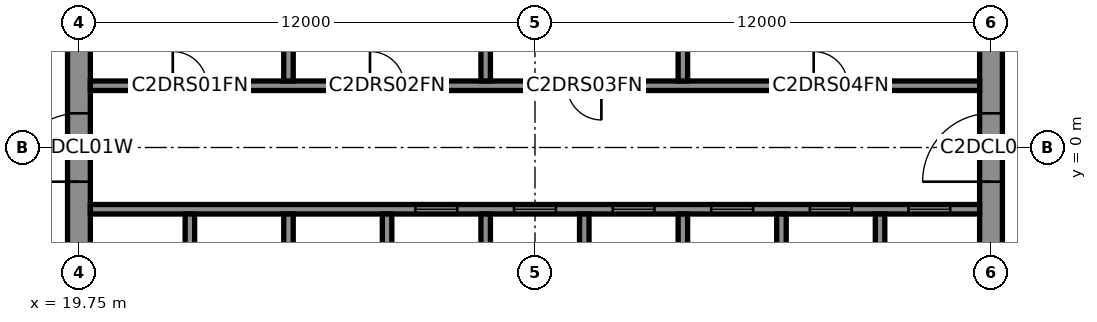
"""IFC4 building model, lengths in metres.
Left out: names, types, materials, properties, quantities, classifications, styles, units other than length and angle.
Written with IfcOpenShell. Run it as: python <this file> out.ifc"""

import sys

from ifc_helpers import new_model, si_unit, direction, frame, frame_2d, origin, place, context, subcontext, project, spatial, rectangle, extrude, element, fill, save


model = new_model("IFC4")
c1 = context("Model", 3, precision=1e-05, world=origin(), true_north=direction((0.0, 1.0)))
c2 = subcontext(c1, "Body", "Model", "MODEL_VIEW")
j1 = project(units=[si_unit("LENGTHUNIT", "METRE"), si_unit("PLANEANGLEUNIT", "RADIAN")], contexts=[c1])
p1 = place(None, origin())
s1 = spatial("IfcSite", under=j1, at=p1, CompositionType="ELEMENT")
p2 = place(p1, origin())
s2 = spatial("IfcBuilding", under=s1, at=p2, CompositionType="ELEMENT")
p3 = place(p2, frame((0.0, 0.0, 204.5)))
s3 = spatial("IfcBuildingStorey", under=s2, at=p3, CompositionType="ELEMENT", Elevation=204.5)
p4 = place(p3, frame((43.75, -8.0, 0.0), z_axis=(0.0, 0.0, 1.0), x_axis=(0.0, 1.0, 0.0)))
e1 = element("IfcWall", 1, at=p4, inside=s3, PredefinedType="SHEAR", context=c2, shape_type="SweptSolid", body=[
    extrude(rectangle(XDim=16.0, YDim=0.6, at=frame_2d((8.0, 0.0))), origin(), (0.0, 0.0, 1.0), 6.0),
])
p5 = place(p4, frame((7.1, 0.0, 0.0)))
e2 = element("IfcOpeningElement", 2, at=p5, cuts=e1, PredefinedType="OPENING", context=c2, shape_type="SweptSolid", body=[
    extrude(rectangle(XDim=1.8, YDim=2.1, at=frame_2d((0.9, 1.05))), frame((0.0, 0.31, 0.0), z_axis=(0.0, -1.0, 0.0), x_axis=(1.0, 0.0, 0.0)), (0.0, 0.0, 1.0), 0.62),
])
p6 = place(p3, frame((19.75, -8.0, 0.0), z_axis=(0.0, 0.0, 1.0), x_axis=(0.0, 1.0, 0.0)))
e3 = element("IfcWall", 3, at=p6, inside=s3, PredefinedType="SHEAR", context=c2, shape_type="SweptSolid", body=[
    extrude(rectangle(XDim=16.0, YDim=0.6, at=frame_2d((8.0, 0.0))), origin(), (0.0, 0.0, 1.0), 6.0),
])
p7 = place(p6, frame((7.1, 0.0, 0.0)))
e4 = element("IfcOpeningElement", 4, at=p7, cuts=e3, PredefinedType="OPENING", context=c2, shape_type="SweptSolid", body=[
    extrude(rectangle(XDim=1.8, YDim=2.1, at=frame_2d((0.9, 1.05))), frame((0.0, 0.31, 0.0), z_axis=(0.0, -1.0, 0.0), x_axis=(1.0, 0.0, 0.0)), (0.0, 0.0, 1.0), 0.62),
])
p8 = place(p3, frame((20.05, 1.625, 0.0), z_axis=(0.0, 0.0, 1.0), x_axis=(1.0, 0.0, 0.0)))
e5 = element("IfcWall", 5, at=p8, inside=s3, PredefinedType="SHEAR", context=c2, shape_type="SweptSolid", body=[
    extrude(rectangle(XDim=23.4, YDim=0.25, at=frame_2d((11.7, 0.0))), origin(), (0.0, 0.0, 1.0), 6.0),
])
p9 = place(p8, frame((2.169, 0.0, 0.0)))
e6 = element("IfcOpeningElement", 6, at=p9, cuts=e5, PredefinedType="OPENING", context=c2, shape_type="SweptSolid", body=[
    extrude(rectangle(XDim=0.9, YDim=2.1, at=frame_2d((0.45, 1.05))), frame((0.0, 0.135, 0.0), z_axis=(0.0, -1.0, 0.0), x_axis=(1.0, 0.0, 0.0)), (0.0, 0.0, 1.0), 0.27),
])
p10 = place(p8, frame((7.358, 0.0, 0.0)))
e7 = element("IfcOpeningElement", 7, at=p10, cuts=e5, PredefinedType="OPENING", context=c2, shape_type="SweptSolid", body=[
    extrude(rectangle(XDim=0.9, YDim=2.1, at=frame_2d((0.45, 1.05))), frame((0.0, 0.135, 0.0), z_axis=(0.0, -1.0, 0.0), x_axis=(1.0, 0.0, 0.0)), (0.0, 0.0, 1.0), 0.27),
])
p11 = place(p8, frame((12.547, 0.0, 0.0)))
e8 = element("IfcOpeningElement", 8, at=p11, cuts=e5, PredefinedType="OPENING", context=c2, shape_type="SweptSolid", body=[
    extrude(rectangle(XDim=0.9, YDim=2.1, at=frame_2d((0.45, 1.05))), frame((0.0, 0.135, 0.0), z_axis=(0.0, -1.0, 0.0), x_axis=(1.0, 0.0, 0.0)), (0.0, 0.0, 1.0), 0.27),
])
p12 = place(p8, frame((19.033, 0.0, 0.0)))
e9 = element("IfcOpeningElement", 9, at=p12, cuts=e5, PredefinedType="OPENING", context=c2, shape_type="SweptSolid", body=[
    extrude(rectangle(XDim=0.9, YDim=2.1, at=frame_2d((0.45, 1.05))), frame((0.0, 0.135, 0.0), z_axis=(0.0, -1.0, 0.0), x_axis=(1.0, 0.0, 0.0)), (0.0, 0.0, 1.0), 0.27),
])
p13 = place(p3, frame((20.05, -1.625, 0.0), z_axis=(0.0, 0.0, 1.0), x_axis=(1.0, 0.0, 0.0)))
e10 = element("IfcWall", 10, at=p13, inside=s3, PredefinedType="SHEAR", context=c2, shape_type="SweptSolid", body=[
    extrude(rectangle(XDim=23.4, YDim=0.25, at=frame_2d((11.7, 0.0))), origin(), (0.0, 0.0, 1.0), 6.0),
])
p14 = place(p13, frame((8.556, 0.0, 0.0)))
e11 = element("IfcOpeningElement", 11, at=p14, cuts=e10, PredefinedType="OPENING", context=c2, shape_type="SweptSolid", body=[
    extrude(rectangle(XDim=1.1, YDim=2.1, at=frame_2d((0.55, 1.05))), frame((0.0, 0.135, 0.0), z_axis=(0.0, -1.0, 0.0), x_axis=(1.0, 0.0, 0.0)), (0.0, 0.0, 1.0), 0.27),
])
p15 = place(p13, frame((11.15, 0.0, 0.0)))
e12 = element("IfcOpeningElement", 12, at=p15, cuts=e10, PredefinedType="OPENING", context=c2, shape_type="SweptSolid", body=[
    extrude(rectangle(XDim=1.1, YDim=2.1, at=frame_2d((0.55, 1.05))), frame((0.0, 0.135, 0.0), z_axis=(0.0, -1.0, 0.0), x_axis=(1.0, 0.0, 0.0)), (0.0, 0.0, 1.0), 0.27),
])
p16 = place(p13, frame((13.744, 0.0, 0.0)))
e13 = element("IfcOpeningElement", 13, at=p16, cuts=e10, PredefinedType="OPENING", context=c2, shape_type="SweptSolid", body=[
    extrude(rectangle(XDim=1.1, YDim=2.1, at=frame_2d((0.55, 1.05))), frame((0.0, 0.135, 0.0), z_axis=(0.0, -1.0, 0.0), x_axis=(1.0, 0.0, 0.0)), (0.0, 0.0, 1.0), 0.27),
])
p17 = place(p13, frame((16.339, 0.0, 0.0)))
e14 = element("IfcOpeningElement", 14, at=p17, cuts=e10, PredefinedType="OPENING", context=c2, shape_type="SweptSolid", body=[
    extrude(rectangle(XDim=1.1, YDim=2.1, at=frame_2d((0.55, 1.05))), frame((0.0, 0.135, 0.0), z_axis=(0.0, -1.0, 0.0), x_axis=(1.0, 0.0, 0.0)), (0.0, 0.0, 1.0), 0.27),
])
p18 = place(p13, frame((18.933, 0.0, 0.0)))
e15 = element("IfcOpeningElement", 15, at=p18, cuts=e10, PredefinedType="OPENING", context=c2, shape_type="SweptSolid", body=[
    extrude(rectangle(XDim=1.1, YDim=2.1, at=frame_2d((0.55, 1.05))), frame((0.0, 0.135, 0.0), z_axis=(0.0, -1.0, 0.0), x_axis=(1.0, 0.0, 0.0)), (0.0, 0.0, 1.0), 0.27),
])
p19 = place(p13, frame((21.528, 0.0, 0.0)))
e16 = element("IfcOpeningElement", 16, at=p19, cuts=e10, PredefinedType="OPENING", context=c2, shape_type="SweptSolid", body=[
    extrude(rectangle(XDim=1.1, YDim=2.1, at=frame_2d((0.55, 1.05))), frame((0.0, 0.135, 0.0), z_axis=(0.0, -1.0, 0.0), x_axis=(1.0, 0.0, 0.0)), (0.0, 0.0, 1.0), 0.27),
])
for number, where, z_axis, x_axis in (
    (17, (25.264, 1.75, 0.0), (0.0, 0.0, 1.0), (0.0, 1.0, 0.0)),
    (18, (30.453, 1.75, 0.0), (0.0, 0.0, 1.0), (0.0, 1.0, 0.0)),
    (19, (35.642, 1.75, 0.0), (0.0, 0.0, 1.0), (0.0, 1.0, 0.0)),
    (20, (22.669, -4.15, 0.0), (0.0, 0.0, 1.0), (0.0, 1.0, 0.0)),
    (21, (25.264, -4.15, 0.0), (0.0, 0.0, 1.0), (0.0, 1.0, 0.0)),
    (22, (27.858, -4.15, 0.0), (0.0, 0.0, 1.0), (0.0, 1.0, 0.0)),
    (23, (30.453, -4.15, 0.0), (0.0, 0.0, 1.0), (0.0, 1.0, 0.0)),
    (24, (33.047, -4.15, 0.0), (0.0, 0.0, 1.0), (0.0, 1.0, 0.0)),
    (25, (35.642, -4.15, 0.0), (0.0, 0.0, 1.0), (0.0, 1.0, 0.0)),
    (26, (38.236, -4.15, 0.0), (0.0, 0.0, 1.0), (0.0, 1.0, 0.0)),
    (27, (40.831, -4.15, 0.0), (0.0, 0.0, 1.0), (0.0, 1.0, 0.0)),
):
    element("IfcWall", number, at=place(p3, frame(where, z_axis=z_axis, x_axis=x_axis)), inside=s3, PredefinedType="SHEAR", context=c2, shape_type="SweptSolid", body=[
        extrude(rectangle(XDim=2.4, YDim=0.25, at=frame_2d((1.2, 0.0))), origin(), (0.0, 0.0, 1.0), 6.0),
    ])
p20 = place(p5, origin())
e28 = element("IfcDoor", 28, at=p20, inside=s3, OperationType="DOUBLE_DOOR_SINGLE_SWING", PredefinedType="DOOR", context=c2, shape_type="SweptSolid", body=[
    extrude(rectangle(XDim=1.8, YDim=2.1, at=frame_2d((0.9, 1.05))), frame((0.0, 0.3, 0.0), z_axis=(0.0, -1.0, 0.0), x_axis=(1.0, 0.0, 0.0)), (0.0, 0.0, 1.0), 0.05),
])
fill(e2, e28)
p21 = place(p7, origin())
e29 = element("IfcDoor", 29, at=p21, inside=s3, OperationType="DOUBLE_DOOR_SINGLE_SWING", PredefinedType="DOOR", context=c2, shape_type="SweptSolid", body=[
    extrude(rectangle(XDim=1.8, YDim=2.1, at=frame_2d((0.9, 1.05))), frame((0.0, -0.25, 0.0), z_axis=(0.0, -1.0, 0.0), x_axis=(1.0, 0.0, 0.0)), (0.0, 0.0, 1.0), 0.05),
])
fill(e4, e29)
p22 = place(p9, origin())
e30 = element("IfcDoor", 30, at=p22, inside=s3, OperationType="SINGLE_SWING_LEFT", PredefinedType="DOOR", context=c2, shape_type="SweptSolid", body=[
    extrude(rectangle(XDim=0.9, YDim=2.1, at=frame_2d((0.45, 1.05))), frame((0.0, 0.025, 0.0), z_axis=(0.0, -1.0, 0.0), x_axis=(1.0, 0.0, 0.0)), (0.0, 0.0, 1.0), 0.05),
])
fill(e6, e30)
p23 = place(p10, origin())
e31 = element("IfcDoor", 31, at=p23, inside=s3, OperationType="SINGLE_SWING_LEFT", PredefinedType="DOOR", context=c2, shape_type="SweptSolid", body=[
    extrude(rectangle(XDim=0.9, YDim=2.1, at=frame_2d((0.45, 1.05))), frame((0.0, 0.025, 0.0), z_axis=(0.0, -1.0, 0.0), x_axis=(1.0, 0.0, 0.0)), (0.0, 0.0, 1.0), 0.05),
])
fill(e7, e31)
p24 = place(p11, origin())
e32 = element("IfcDoor", 32, at=p24, inside=s3, OperationType="SINGLE_SWING_RIGHT", PredefinedType="DOOR", context=c2, shape_type="SweptSolid", body=[
    extrude(rectangle(XDim=0.9, YDim=2.1, at=frame_2d((0.45, 1.05))), frame((0.0, 0.025, 0.0), z_axis=(0.0, -1.0, 0.0), x_axis=(1.0, 0.0, 0.0)), (0.0, 0.0, 1.0), 0.05),
])
fill(e8, e32)
p25 = place(p12, origin())
e33 = element("IfcDoor", 33, at=p25, inside=s3, OperationType="SINGLE_SWING_LEFT", PredefinedType="DOOR", context=c2, shape_type="SweptSolid", body=[
    extrude(rectangle(XDim=0.9, YDim=2.1, at=frame_2d((0.45, 1.05))), frame((0.0, 0.025, 0.0), z_axis=(0.0, -1.0, 0.0), x_axis=(1.0, 0.0, 0.0)), (0.0, 0.0, 1.0), 0.05),
])
fill(e9, e33)
p26 = place(p14, origin())
e34 = element("IfcDoor", 34, at=p26, inside=s3, OperationType="DOUBLE_DOOR_SLIDING", PredefinedType="DOOR", context=c2, shape_type="SweptSolid", body=[
    extrude(rectangle(XDim=1.1, YDim=2.1, at=frame_2d((0.55, 1.05))), frame((0.0, 0.025, 0.0), z_axis=(0.0, -1.0, 0.0), x_axis=(1.0, 0.0, 0.0)), (0.0, 0.0, 1.0), 0.05),
])
fill(e11, e34)
p27 = place(p15, origin())
e35 = element("IfcDoor", 35, at=p27, inside=s3, OperationType="DOUBLE_DOOR_SLIDING", PredefinedType="DOOR", context=c2, shape_type="SweptSolid", body=[
    extrude(rectangle(XDim=1.1, YDim=2.1, at=frame_2d((0.55, 1.05))), frame((0.0, 0.025, 0.0), z_axis=(0.0, -1.0, 0.0), x_axis=(1.0, 0.0, 0.0)), (0.0, 0.0, 1.0), 0.05),
])
fill(e12, e35)
p28 = place(p16, origin())
e36 = element("IfcDoor", 36, at=p28, inside=s3, OperationType="DOUBLE_DOOR_SLIDING", PredefinedType="DOOR", context=c2, shape_type="SweptSolid", body=[
    extrude(rectangle(XDim=1.1, YDim=2.1, at=frame_2d((0.55, 1.05))), frame((0.0, 0.025, 0.0), z_axis=(0.0, -1.0, 0.0), x_axis=(1.0, 0.0, 0.0)), (0.0, 0.0, 1.0), 0.05),
])
fill(e13, e36)
p29 = place(p17, origin())
e37 = element("IfcDoor", 37, at=p29, inside=s3, OperationType="DOUBLE_DOOR_SLIDING", PredefinedType="DOOR", context=c2, shape_type="SweptSolid", body=[
    extrude(rectangle(XDim=1.1, YDim=2.1, at=frame_2d((0.55, 1.05))), frame((0.0, 0.025, 0.0), z_axis=(0.0, -1.0, 0.0), x_axis=(1.0, 0.0, 0.0)), (0.0, 0.0, 1.0), 0.05),
])
fill(e14, e37)
p30 = place(p18, origin())
e38 = element("IfcDoor", 38, at=p30, inside=s3, OperationType="DOUBLE_DOOR_SLIDING", PredefinedType="DOOR", context=c2, shape_type="SweptSolid", body=[
    extrude(rectangle(XDim=1.1, YDim=2.1, at=frame_2d((0.55, 1.05))), frame((0.0, 0.025, 0.0), z_axis=(0.0, -1.0, 0.0), x_axis=(1.0, 0.0, 0.0)), (0.0, 0.0, 1.0), 0.05),
])
fill(e15, e38)
p31 = place(p19, origin())
e39 = element("IfcDoor", 39, at=p31, inside=s3, OperationType="DOUBLE_DOOR_SLIDING", PredefinedType="DOOR", context=c2, shape_type="SweptSolid", body=[
    extrude(rectangle(XDim=1.1, YDim=2.1, at=frame_2d((0.55, 1.05))), frame((0.0, 0.025, 0.0), z_axis=(0.0, -1.0, 0.0), x_axis=(1.0, 0.0, 0.0)), (0.0, 0.0, 1.0), 0.05),
])
fill(e16, e39)
save(model, sys.argv[1])
